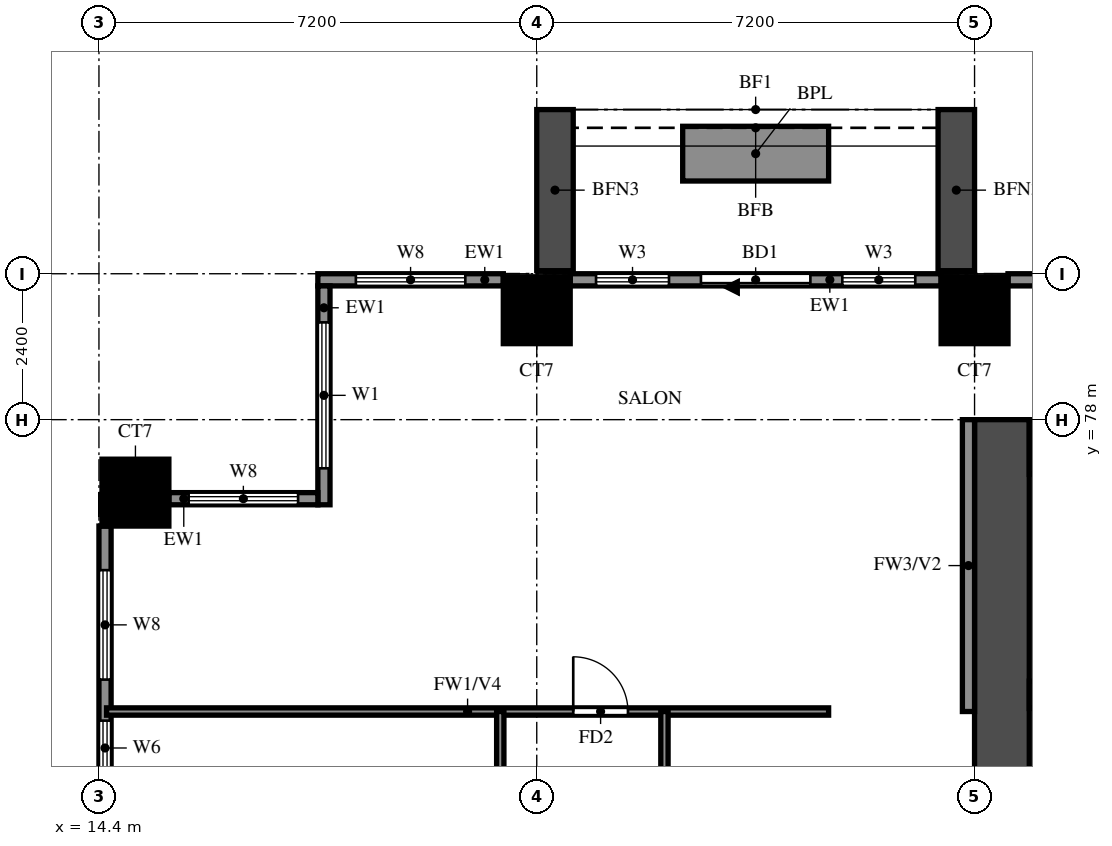
"""IFC4 building model, lengths in metres.
Left out: names, types, materials, properties, quantities, classifications, styles, units other than length and angle.
Written with IfcOpenShell. Run it as: python <this file> out.ifc"""

import sys

from ifc_helpers import new_model, si_unit, direction, frame, frame_2d, origin, origin_2d, place, context, subcontext, project, spatial, rectangle, extrude, source, transform, mapped, element, fill, save


model = new_model("IFC4")
c1 = context("Model", 3, precision=1e-05, world=origin(), true_north=direction((0.0, 1.0)))
c2 = subcontext(c1, "Body", "Model", "MODEL_VIEW")
j1 = project(units=[si_unit("LENGTHUNIT", "METRE"), si_unit("PLANEANGLEUNIT", "RADIAN")], contexts=[c1])
p1 = place(None, origin())
s1 = spatial("IfcSite", under=j1, at=p1, CompositionType="ELEMENT")
p2 = place(p1, origin())
s2 = spatial("IfcBuilding", under=s1, at=p2, CompositionType="ELEMENT")
p3 = place(p2, frame((0.0, 0.0, 34.0)))
s3 = spatial("IfcBuildingStorey", under=s2, at=p3, CompositionType="ELEMENT", Elevation=34.0)
m1 = source(origin(), c2, "Body", "SweptSolid", [
    extrude(rectangle(XDim=1.1, YDim=1.1, at=origin_2d()), origin(), (0.0, 0.0, 1.0), 3.18),
])
for number, where, z_axis, x_axis in (
    (1, (15.0, 76.8, 0.0), (0.0, 0.0, 1.0), (1.0, 0.0, 0.0)),
    (2, (21.6, 79.8, 0.0), (0.0, 0.0, 1.0), (1.0, 0.0, 0.0)),
    (3, (28.8, 79.8, 0.0), (0.0, 0.0, 1.0), (1.0, 0.0, 0.0)),
):
    element("IfcColumn", number, at=place(p3, frame(where, z_axis=z_axis, x_axis=x_axis)), inside=s3, PredefinedType="COLUMN", context=c2, shape_type="MappedRepresentation", body=[
        mapped(m1, transform((0.0, 0.0, 0.0))),
    ])
p4 = place(p3, frame((29.25, 66.0, 0.0), z_axis=(0.0, 0.0, 1.0), x_axis=(0.0, 1.0, 0.0)))
e4 = element("IfcWall", 4, at=p4, inside=s3, PredefinedType="SHEAR", context=c2, shape_type="SweptSolid", body=[
    extrude(rectangle(XDim=12.0, YDim=0.9, at=frame_2d((6.0, 0.0))), origin(), (0.0, 0.0, 1.0), 3.18),
])
p5 = place(p3, frame((29.7, 77.55, 0.0), z_axis=(0.0, 0.0, 1.0), x_axis=(1.0, 0.0, 0.0)))
e5 = element("IfcWall", 5, at=p5, inside=s3, PredefinedType="SHEAR", context=c2, shape_type="SweptSolid", body=[
    extrude(rectangle(XDim=41.4, YDim=0.9, at=frame_2d((20.7, 0.0))), origin(), (0.0, 0.0, 1.0), 3.18),
])
p6 = place(p3, frame((29.7, 73.475, 0.0), z_axis=(0.0, 0.0, 1.0), x_axis=(1.0, 0.0, 0.0)))
e6 = element("IfcWall", 6, at=p6, inside=s3, PredefinedType="SHEAR", context=c2, shape_type="SweptSolid", body=[
    extrude(rectangle(XDim=3.175, YDim=0.45, at=frame_2d((1.587, 0.0))), origin(), (0.0, 0.0, 1.0), 3.18),
])
p7 = place(p3, frame((35.45, 80.3, 0.0), z_axis=(0.0, 0.0, 1.0), x_axis=(-1.0, 0.0, 0.0)))
e7 = element("IfcWall", 7, at=p7, inside=s3, PredefinedType="SOLIDWALL", context=c2, shape_type="SweptSolid", body=[
    extrude(rectangle(XDim=6.1, YDim=0.2, at=frame_2d((3.05, 0.0))), origin(), (0.0, 0.0, 1.0), 3.18),
])
p8 = place(p3, frame((28.25, 80.3, 0.0), z_axis=(0.0, 0.0, 1.0), x_axis=(-1.0, 0.0, 0.0)))
e8 = element("IfcWall", 8, at=p8, inside=s3, PredefinedType="SOLIDWALL", context=c2, shape_type="SweptSolid", body=[
    extrude(rectangle(XDim=6.1, YDim=0.2, at=frame_2d((3.05, 0.0))), origin(), (0.0, 0.0, 1.0), 3.18),
])
p9 = place(p8, frame((2.15, 0.0, 0.0)))
e9 = element("IfcOpeningElement", 9, at=p9, cuts=e8, PredefinedType="OPENING", context=c2, shape_type="SweptSolid", body=[
    extrude(rectangle(XDim=1.8, YDim=2.4, at=frame_2d((0.9, 1.2))), frame((0.0, 0.11, 0.0), z_axis=(0.0, -1.0, 0.0), x_axis=(1.0, 0.0, 0.0)), (0.0, 0.0, 1.0), 0.22),
])
p10 = place(p8, frame((0.425, 0.0, 0.6)))
e10 = element("IfcOpeningElement", 10, at=p10, cuts=e8, PredefinedType="OPENING", context=c2, shape_type="SweptSolid", body=[
    extrude(rectangle(XDim=1.2, YDim=2.4, at=frame_2d((0.6, 1.2))), frame((0.0, 0.11, 0.0), z_axis=(0.0, -1.0, 0.0), x_axis=(1.0, 0.0, 0.0)), (0.0, 0.0, 1.0), 0.22),
])
p11 = place(p8, frame((4.475, 0.0, 0.6)))
e11 = element("IfcOpeningElement", 11, at=p11, cuts=e8, PredefinedType="OPENING", context=c2, shape_type="SweptSolid", body=[
    extrude(rectangle(XDim=1.2, YDim=2.4, at=frame_2d((0.6, 1.2))), frame((0.0, 0.11, 0.0), z_axis=(0.0, -1.0, 0.0), x_axis=(1.0, 0.0, 0.0)), (0.0, 0.0, 1.0), 0.22),
])
p12 = place(p3, frame((21.05, 80.3, 0.0), z_axis=(0.0, 0.0, 1.0), x_axis=(-1.0, 0.0, 0.0)))
e12 = element("IfcWall", 12, at=p12, inside=s3, PredefinedType="SOLIDWALL", context=c2, shape_type="SweptSolid", body=[
    extrude(rectangle(XDim=3.05, YDim=0.2, at=frame_2d((1.525, 0.0))), origin(), (0.0, 0.0, 1.0), 3.18),
])
p13 = place(p12, frame((0.625, 0.0, 0.6)))
e13 = element("IfcOpeningElement", 13, at=p13, cuts=e12, PredefinedType="OPENING", context=c2, shape_type="SweptSolid", body=[
    extrude(rectangle(XDim=1.8, YDim=2.4, at=frame_2d((0.9, 1.2))), frame((0.0, 0.11, 0.0), z_axis=(0.0, -1.0, 0.0), x_axis=(1.0, 0.0, 0.0)), (0.0, 0.0, 1.0), 0.22),
])
p14 = place(p3, frame((18.1, 80.2, 0.0), z_axis=(0.0, 0.0, 1.0), x_axis=(0.0, -1.0, 0.0)))
e14 = element("IfcWall", 14, at=p14, inside=s3, PredefinedType="SOLIDWALL", context=c2, shape_type="SweptSolid", body=[
    extrude(rectangle(XDim=3.6, YDim=0.2, at=frame_2d((1.8, 0.0))), origin(), (0.0, 0.0, 1.0), 3.18),
])
p15 = place(p14, frame((0.6, 0.0, 0.6)))
e15 = element("IfcOpeningElement", 15, at=p15, cuts=e14, PredefinedType="OPENING", context=c2, shape_type="SweptSolid", body=[
    extrude(rectangle(XDim=2.4, YDim=2.4, at=frame_2d((1.2, 1.2))), frame((0.0, 0.11, 0.0), z_axis=(0.0, -1.0, 0.0), x_axis=(1.0, 0.0, 0.0)), (0.0, 0.0, 1.0), 0.22),
])
p16 = place(p3, frame((18.0, 76.7, 0.0), z_axis=(0.0, 0.0, 1.0), x_axis=(-1.0, 0.0, 0.0)))
e16 = element("IfcWall", 16, at=p16, inside=s3, PredefinedType="SOLIDWALL", context=c2, shape_type="SweptSolid", body=[
    extrude(rectangle(XDim=2.45, YDim=0.2, at=frame_2d((1.225, 0.0))), origin(), (0.0, 0.0, 1.0), 3.18),
])
p17 = place(p16, frame((0.325, 0.0, 0.6)))
e17 = element("IfcOpeningElement", 17, at=p17, cuts=e16, PredefinedType="OPENING", context=c2, shape_type="SweptSolid", body=[
    extrude(rectangle(XDim=1.8, YDim=2.4, at=frame_2d((0.9, 1.2))), frame((0.0, 0.11, 0.0), z_axis=(0.0, -1.0, 0.0), x_axis=(1.0, 0.0, 0.0)), (0.0, 0.0, 1.0), 0.22),
])
p18 = place(p3, frame((14.5, 76.25, 0.0), z_axis=(0.0, 0.0, 1.0), x_axis=(0.0, -1.0, 0.0)))
e18 = element("IfcWall", 18, at=p18, inside=s3, PredefinedType="SOLIDWALL", context=c2, shape_type="SweptSolid", body=[
    extrude(rectangle(XDim=6.1, YDim=0.2, at=frame_2d((3.05, 0.0))), origin(), (0.0, 0.0, 1.0), 3.18),
])
p19 = place(p18, frame((3.2, 0.0, 1.5)))
e19 = element("IfcOpeningElement", 19, at=p19, cuts=e18, PredefinedType="OPENING", context=c2, shape_type="SweptSolid", body=[
    extrude(rectangle(XDim=0.9, YDim=0.9, at=frame_2d((0.45, 0.45))), frame((0.0, 0.11, 0.0), z_axis=(0.0, -1.0, 0.0), x_axis=(1.0, 0.0, 0.0)), (0.0, 0.0, 1.0), 0.22),
])
p20 = place(p18, frame((0.725, 0.0, 0.6)))
e20 = element("IfcOpeningElement", 20, at=p20, cuts=e18, PredefinedType="OPENING", context=c2, shape_type="SweptSolid", body=[
    extrude(rectangle(XDim=1.8, YDim=2.4, at=frame_2d((0.9, 1.2))), frame((0.0, 0.11, 0.0), z_axis=(0.0, -1.0, 0.0), x_axis=(1.0, 0.0, 0.0)), (0.0, 0.0, 1.0), 0.22),
])
for number, where, z_axis, x_axis in (
    (21, (28.5, 80.45, 0.0), (0.0, 0.0, 1.0), (0.0, 1.0, 0.0)),
    (22, (21.9, 80.45, 0.0), (0.0, 0.0, 1.0), (0.0, 1.0, 0.0)),
):
    element("IfcWall", number, at=place(p3, frame(where, z_axis=z_axis, x_axis=x_axis)), inside=s3, PredefinedType="SOLIDWALL", context=c2, shape_type="SweptSolid", body=[
        extrude(rectangle(XDim=2.65, YDim=0.6, at=frame_2d((1.325, 0.0))), origin(), (0.0, 0.0, 1.0), 2.85),
    ])
p21 = place(p3, frame((26.4, 82.375, 0.0), z_axis=(0.0, 0.0, 1.0), x_axis=(-1.0, 0.0, 0.0)))
e23 = element("IfcWall", 23, at=p21, inside=s3, PredefinedType="SOLIDWALL", context=c2, shape_type="SweptSolid", body=[
    extrude(rectangle(XDim=2.4, YDim=0.9, at=frame_2d((1.2, 0.0))), origin(), (0.0, 0.0, 1.0), 0.9),
])
p22 = place(p3, frame((28.7, 73.2, 0.0), z_axis=(0.0, 0.0, 1.0), x_axis=(0.0, 1.0, 0.0)))
e24 = element("IfcWall", 24, at=p22, inside=s3, PredefinedType="SOLIDWALL", context=c2, shape_type="SweptSolid", body=[
    extrude(rectangle(XDim=4.8, YDim=0.2, at=frame_2d((2.4, 0.0))), origin(), (0.0, 0.0, 1.0), 3.18),
])
p23 = place(p3, frame((14.525, 73.2, 0.0), z_axis=(0.0, 0.0, 1.0), x_axis=(1.0, 0.0, 0.0)))
e25 = element("IfcWall", 25, at=p23, inside=s3, PredefinedType="PARTITIONING", context=c2, shape_type="SweptSolid", body=[
    extrude(rectangle(XDim=11.875, YDim=0.12, at=frame_2d((5.938, 0.0))), origin(), (0.0, 0.0, 1.0), 2.28),
])
p24 = place(p23, frame((7.675, 0.0, 0.0)))
e26 = element("IfcOpeningElement", 26, at=p24, cuts=e25, PredefinedType="OPENING", context=c2, shape_type="SweptSolid", body=[
    extrude(rectangle(XDim=0.9, YDim=2.1, at=frame_2d((0.45, 1.05))), frame((0.0, 0.07, 0.0), z_axis=(0.0, -1.0, 0.0), x_axis=(1.0, 0.0, 0.0)), (0.0, 0.0, 1.0), 0.14),
])
p25 = place(p3, frame((21.0, 69.6, 0.0), z_axis=(0.0, 0.0, 1.0), x_axis=(0.0, 1.0, 0.0)))
e27 = element("IfcWall", 27, at=p25, inside=s3, PredefinedType="PARTITIONING", context=c2, shape_type="SweptSolid", body=[
    extrude(rectangle(XDim=3.6, YDim=0.12, at=frame_2d((1.8, 0.0))), origin(), (0.0, 0.0, 1.0), 3.18),
])
p26 = place(p3, frame((23.7, 64.8, 0.0), z_axis=(0.0, 0.0, 1.0), x_axis=(0.0, 1.0, 0.0)))
e28 = element("IfcWall", 28, at=p26, inside=s3, PredefinedType="PARTITIONING", context=c2, shape_type="SweptSolid", body=[
    extrude(rectangle(XDim=8.4, YDim=0.12, at=frame_2d((4.2, 0.0))), origin(), (0.0, 0.0, 1.0), 3.18),
])
p27 = place(p26, frame((4.875, 0.0, 0.0)))
e29 = element("IfcOpeningElement", 29, at=p27, cuts=e28, PredefinedType="OPENING", context=c2, shape_type="SweptSolid", body=[
    extrude(rectangle(XDim=0.9, YDim=2.1, at=frame_2d((0.45, 1.05))), frame((0.0, 0.07, 0.0), z_axis=(0.0, -1.0, 0.0), x_axis=(1.0, 0.0, 0.0)), (0.0, 0.0, 1.0), 0.14),
])
p28 = place(p9, origin())
e30 = element("IfcDoor", 30, at=p28, inside=s3, OperationType="DOUBLE_DOOR_SLIDING", PredefinedType="DOOR", context=c2, shape_type="SweptSolid", body=[
    extrude(rectangle(XDim=1.8, YDim=2.4, at=frame_2d((0.9, 1.2))), frame((0.0, 0.025, 0.0), z_axis=(0.0, -1.0, 0.0), x_axis=(1.0, 0.0, 0.0)), (0.0, 0.0, 1.0), 0.05),
])
fill(e9, e30)
p29 = place(p10, origin())
e31 = element("IfcWindow", 31, at=p29, inside=s3, PartitioningType="SINGLE_PANEL", PredefinedType="WINDOW", context=c2, shape_type="SweptSolid", body=[
    extrude(rectangle(XDim=1.2, YDim=2.4, at=frame_2d((0.6, 1.2))), frame((0.0, 0.03, 0.0), z_axis=(0.0, -1.0, 0.0), x_axis=(1.0, 0.0, 0.0)), (0.0, 0.0, 1.0), 0.06),
])
fill(e10, e31)
p30 = place(p11, origin())
e32 = element("IfcWindow", 32, at=p30, inside=s3, PartitioningType="SINGLE_PANEL", PredefinedType="WINDOW", context=c2, shape_type="SweptSolid", body=[
    extrude(rectangle(XDim=1.2, YDim=2.4, at=frame_2d((0.6, 1.2))), frame((0.0, 0.03, 0.0), z_axis=(0.0, -1.0, 0.0), x_axis=(1.0, 0.0, 0.0)), (0.0, 0.0, 1.0), 0.06),
])
fill(e11, e32)
p31 = place(p13, origin())
e33 = element("IfcWindow", 33, at=p31, inside=s3, PartitioningType="DOUBLE_PANEL_VERTICAL", PredefinedType="WINDOW", context=c2, shape_type="SweptSolid", body=[
    extrude(rectangle(XDim=1.8, YDim=2.4, at=frame_2d((0.9, 1.2))), frame((0.0, 0.03, 0.0), z_axis=(0.0, -1.0, 0.0), x_axis=(1.0, 0.0, 0.0)), (0.0, 0.0, 1.0), 0.06),
])
fill(e13, e33)
p32 = place(p15, origin())
e34 = element("IfcWindow", 34, at=p32, inside=s3, PartitioningType="DOUBLE_PANEL_VERTICAL", PredefinedType="WINDOW", context=c2, shape_type="SweptSolid", body=[
    extrude(rectangle(XDim=2.4, YDim=2.4, at=frame_2d((1.2, 1.2))), frame((0.0, 0.03, 0.0), z_axis=(0.0, -1.0, 0.0), x_axis=(1.0, 0.0, 0.0)), (0.0, 0.0, 1.0), 0.06),
])
fill(e15, e34)
p33 = place(p17, origin())
e35 = element("IfcWindow", 35, at=p33, inside=s3, PartitioningType="DOUBLE_PANEL_VERTICAL", PredefinedType="WINDOW", context=c2, shape_type="SweptSolid", body=[
    extrude(rectangle(XDim=1.8, YDim=2.4, at=frame_2d((0.9, 1.2))), frame((0.0, 0.03, 0.0), z_axis=(0.0, -1.0, 0.0), x_axis=(1.0, 0.0, 0.0)), (0.0, 0.0, 1.0), 0.06),
])
fill(e17, e35)
p34 = place(p19, origin())
e36 = element("IfcWindow", 36, at=p34, inside=s3, PartitioningType="SINGLE_PANEL", PredefinedType="WINDOW", context=c2, shape_type="SweptSolid", body=[
    extrude(rectangle(XDim=0.9, YDim=0.9, at=frame_2d((0.45, 0.45))), frame((0.0, 0.03, 0.0), z_axis=(0.0, -1.0, 0.0), x_axis=(1.0, 0.0, 0.0)), (0.0, 0.0, 1.0), 0.06),
])
fill(e19, e36)
p35 = place(p20, origin())
e37 = element("IfcWindow", 37, at=p35, inside=s3, PartitioningType="DOUBLE_PANEL_VERTICAL", PredefinedType="WINDOW", context=c2, shape_type="SweptSolid", body=[
    extrude(rectangle(XDim=1.8, YDim=2.4, at=frame_2d((0.9, 1.2))), frame((0.0, 0.03, 0.0), z_axis=(0.0, -1.0, 0.0), x_axis=(1.0, 0.0, 0.0)), (0.0, 0.0, 1.0), 0.06),
])
fill(e20, e37)
p36 = place(p24, origin())
e38 = element("IfcDoor", 38, at=p36, inside=s3, OperationType="SINGLE_SWING_LEFT", PredefinedType="DOOR", context=c2, shape_type="SweptSolid", body=[
    extrude(rectangle(XDim=0.9, YDim=2.1, at=frame_2d((0.45, 1.05))), frame((0.0, 0.025, 0.0), z_axis=(0.0, -1.0, 0.0), x_axis=(1.0, 0.0, 0.0)), (0.0, 0.0, 1.0), 0.05),
])
fill(e26, e38)
save(model, sys.argv[1])
